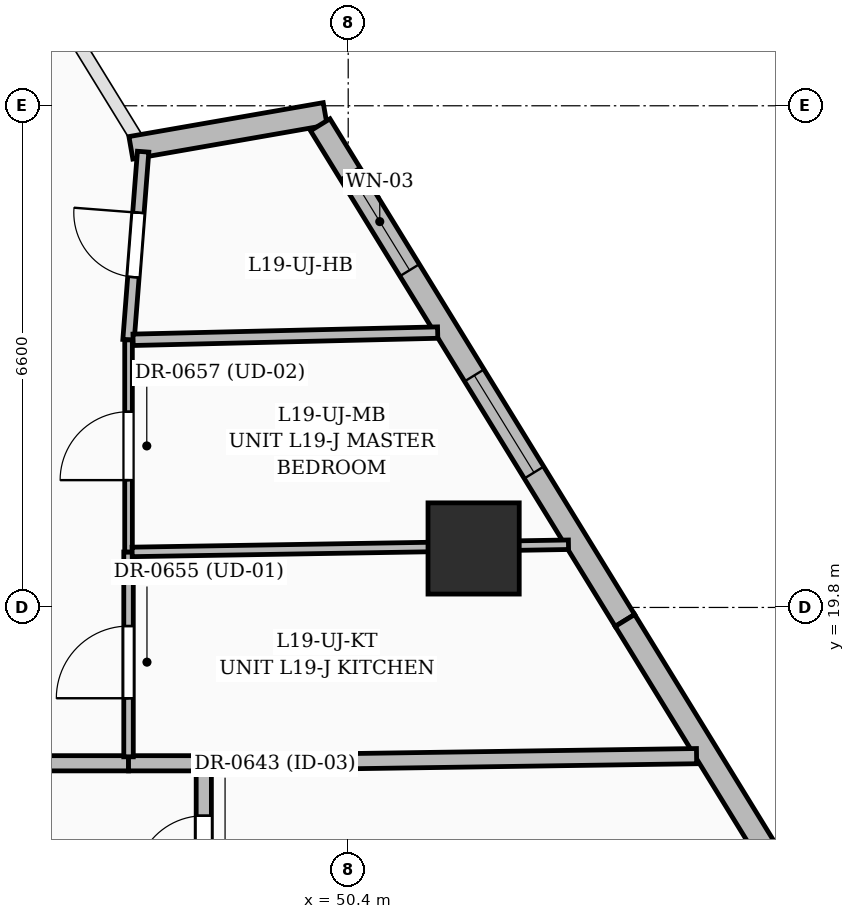
"""IFC4 building model, lengths in metres.
Left out: names, types, materials, properties, quantities, classifications, styles, units other than length and angle.
Written with IfcOpenShell. Run it as: python <this file> out.ifc"""

import sys

from ifc_helpers import new_model, si_unit, direction, frame, frame_2d, origin, origin_2d, place, context, subcontext, project, spatial, rectangle, extrude, element, fill, save


model = new_model("IFC4")
c1 = context("Model", 3, precision=1e-05, world=origin(), true_north=direction((0.0, 1.0)))
c2 = subcontext(c1, "Body", "Model", "MODEL_VIEW")
j1 = project(units=[si_unit("LENGTHUNIT", "METRE"), si_unit("PLANEANGLEUNIT", "RADIAN")], contexts=[c1])
p1 = place(None, origin())
s1 = spatial("IfcSite", under=j1, at=p1, CompositionType="ELEMENT")
p2 = place(p1, origin())
s2 = spatial("IfcBuilding", under=s1, at=p2, CompositionType="ELEMENT")
p3 = place(p2, frame((0.0, 0.0, 78.6)))
s3 = spatial("IfcBuildingStorey", under=s2, at=p3, CompositionType="ELEMENT", Elevation=78.6)
p4 = place(p3, frame((52.05, 20.576, 0.0), z_axis=(0.0, 0.0, 1.0), x_axis=(1.0, 0.0, 0.0)))
e1 = element("IfcColumn", 1, at=p4, inside=s3, PredefinedType="COLUMN", context=c2, shape_type="SweptSolid", body=[
    extrude(rectangle(XDim=1.2, YDim=1.2, at=origin_2d()), origin(), (0.0, 0.0, 1.0), 3.6),
])
p5 = place(p3, frame((47.541, 25.847, 0.0), z_axis=(0.0, 0.0, 1.0), x_axis=(0.985095505459, 0.172008270511, 0.0)))
e2 = element("IfcWall", 2, at=p5, inside=s3, PredefinedType="SOLIDWALL", context=c2, shape_type="SweptSolid", body=[
    extrude(rectangle(XDim=2.594, YDim=0.3, at=frame_2d((1.297, 0.0))), origin(), (0.0, 0.0, 1.0), 2.375),
])
p6 = place(p3, frame((50.032, 26.15, 0.0), z_axis=(0.0, 0.0, 1.0), x_axis=(0.523673810553, -0.851918857721, 0.0)))
e3 = element("IfcWall", 3, at=p6, inside=s3, PredefinedType="SOLIDWALL", context=c2, shape_type="SweptSolid", body=[
    extrude(rectangle(XDim=7.654, YDim=0.3, at=frame_2d((3.827, 0.0))), origin(), (0.0, 0.0, 1.0), 3.35),
])
p7 = place(p6, frame((0.745, 0.0, 0.6)))
e4 = element("IfcOpeningElement", 4, at=p7, cuts=e3, PredefinedType="OPENING", context=c2, shape_type="SweptSolid", body=[
    extrude(rectangle(XDim=1.5, YDim=2.1, at=frame_2d((0.75, 1.05))), frame((0.0, 0.16, 0.0), z_axis=(0.0, -1.0, 0.0), x_axis=(1.0, 0.0, 0.0)), (0.0, 0.0, 1.0), 0.32),
])
p8 = place(p6, frame((3.87, 0.0, 0.6)))
e5 = element("IfcOpeningElement", 5, at=p8, cuts=e3, PredefinedType="OPENING", context=c2, shape_type="SweptSolid", body=[
    extrude(rectangle(XDim=1.5, YDim=2.1, at=frame_2d((0.75, 1.05))), frame((0.0, 0.16, 0.0), z_axis=(0.0, -1.0, 0.0), x_axis=(1.0, 0.0, 0.0)), (0.0, 0.0, 1.0), 0.32),
])
p9 = place(p3, frame((54.041, 19.629, 0.0), z_axis=(0.0, 0.0, 1.0), x_axis=(0.523661280051, -0.851926560083, 0.0)))
e6 = element("IfcWall", 6, at=p9, inside=s3, PredefinedType="SOLIDWALL", context=c2, shape_type="SweptSolid", body=[
    extrude(rectangle(XDim=7.934, YDim=0.3, at=frame_2d((3.967, 0.0))), origin(), (0.0, 0.0, 1.0), 3.35),
])
p10 = place(p9, frame((4.05, 0.0, 0.8)))
e7 = element("IfcOpeningElement", 7, at=p10, cuts=e6, PredefinedType="OPENING", context=c2, shape_type="SweptSolid", body=[
    extrude(rectangle(XDim=1.2, YDim=1.8, at=frame_2d((0.6, 0.9))), frame((0.0, 0.16, 0.0), z_axis=(0.0, -1.0, 0.0), x_axis=(1.0, 0.0, 0.0)), (0.0, 0.0, 1.0), 0.32),
])
p11 = place(p3, frame((48.5, 15.47, 0.0), z_axis=(0.0, 0.0, 1.0), x_axis=(0.0, 1.0, 0.0)))
e8 = element("IfcWall", 8, at=p11, inside=s3, PredefinedType="PARTITIONING", context=c2, shape_type="SweptSolid", body=[
    extrude(rectangle(XDim=2.28, YDim=0.2, at=frame_2d((1.14, 0.0))), origin(), (0.0, 0.0, 1.0), 2.345),
])
p12 = place(p11, frame((0.69, 0.0, 0.0)))
e9 = element("IfcOpeningElement", 9, at=p12, cuts=e8, PredefinedType="OPENING", context=c2, shape_type="SweptSolid", body=[
    extrude(rectangle(XDim=0.9, YDim=2.1, at=frame_2d((0.45, 1.05))), frame((0.0, 0.11, 0.0), z_axis=(0.0, -1.0, 0.0), x_axis=(1.0, 0.0, 0.0)), (0.0, 0.0, 1.0), 0.22),
])
p13 = place(p3, frame((47.51, 17.75, 0.0), z_axis=(0.0, 0.0, 1.0), x_axis=(-1.0, 0.0, 0.0)))
e10 = element("IfcWall", 10, at=p13, inside=s3, PredefinedType="PARTITIONING", context=c2, shape_type="SweptSolid", body=[
    extrude(rectangle(XDim=5.57, YDim=0.2, at=frame_2d((2.785, 0.0))), origin(), (0.0, 0.0, 1.0), 2.309),
])
p14 = place(p13, frame((3.0, 0.0, 0.0)))
e11 = element("IfcOpeningElement", 11, at=p14, cuts=e10, PredefinedType="OPENING", context=c2, shape_type="SweptSolid", body=[
    extrude(rectangle(XDim=1.0, YDim=2.2, at=frame_2d((0.5, 1.1))), frame((0.0, 0.11, 0.0), z_axis=(0.0, -1.0, 0.0), x_axis=(1.0, 0.0, 0.0)), (0.0, 0.0, 1.0), 0.22),
])
p15 = place(p3, frame((48.415, 17.75, 0.0), z_axis=(0.0, 0.0, 1.0), x_axis=(-1.0, 0.0, 0.0)))
e12 = element("IfcWall", 12, at=p15, inside=s3, PredefinedType="PARTITIONING", context=c2, shape_type="SweptSolid", body=[
    extrude(rectangle(XDim=0.905, YDim=0.2, at=frame_2d((0.453, 0.0))), origin(), (0.0, 0.0, 1.0), 3.01),
])
p16 = place(p3, frame((54.983, 17.844, 0.0), z_axis=(0.0, 0.0, 1.0), x_axis=(-0.999894330503, -0.014537118977, 0.0)))
e13 = element("IfcWall", 13, at=p16, inside=s3, PredefinedType="PARTITIONING", context=c2, shape_type="SweptSolid", body=[
    extrude(rectangle(XDim=6.399, YDim=0.2, at=frame_2d((3.199, 0.0))), origin(), (0.0, 0.0, 1.0), 2.345),
])
p17 = place(p3, frame((47.51, 23.32, 0.0), z_axis=(0.0, 0.0, 1.0), x_axis=(0.077275386284, 0.997009786649, 0.0)))
e14 = element("IfcWall", 14, at=p17, inside=s3, PredefinedType="PARTITIONING", context=c2, shape_type="SweptSolid", body=[
    extrude(rectangle(XDim=2.483, YDim=0.15, at=frame_2d((1.242, 0.0))), origin(), (0.0, 0.0, 1.0), 3.35),
])
p18 = place(p17, frame((0.828, 0.0, 0.0)))
e15 = element("IfcOpeningElement", 15, at=p18, cuts=e14, PredefinedType="OPENING", context=c2, shape_type="SweptSolid", body=[
    extrude(rectangle(XDim=0.85, YDim=2.1, at=frame_2d((0.425, 1.05))), frame((0.0, 0.085, 0.0), z_axis=(0.0, -1.0, 0.0), x_axis=(1.0, 0.0, 0.0)), (0.0, 0.0, 1.0), 0.17),
])
p19 = place(p3, frame((47.51, 17.835, 0.0), z_axis=(0.0, 0.0, 1.0), x_axis=(0.0, 1.0, 0.0)))
e16 = element("IfcWall", 16, at=p19, inside=s3, PredefinedType="PARTITIONING", context=c2, shape_type="SweptSolid", body=[
    extrude(rectangle(XDim=2.695, YDim=0.125, at=frame_2d((1.348, 0.0))), origin(), (0.0, 0.0, 1.0), 3.01),
])
p20 = place(p19, frame((0.771, 0.0, 0.0)))
e17 = element("IfcOpeningElement", 17, at=p20, cuts=e16, PredefinedType="OPENING", context=c2, shape_type="SweptSolid", body=[
    extrude(rectangle(XDim=0.95, YDim=2.2, at=frame_2d((0.475, 1.1))), frame((0.0, 0.072, 0.0), z_axis=(0.0, -1.0, 0.0), x_axis=(1.0, 0.0, 0.0)), (0.0, 0.0, 1.0), 0.145),
])
p21 = place(p3, frame((47.51, 20.53, 0.0), z_axis=(0.0, 0.0, 1.0), x_axis=(0.0, 1.0, 0.0)))
e18 = element("IfcWall", 18, at=p21, inside=s3, PredefinedType="PARTITIONING", context=c2, shape_type="SweptSolid", body=[
    extrude(rectangle(XDim=2.79, YDim=0.1, at=frame_2d((1.395, 0.0))), origin(), (0.0, 0.0, 1.0), 3.01),
])
p22 = place(p21, frame((0.945, 0.0, 0.0)))
e19 = element("IfcOpeningElement", 19, at=p22, cuts=e18, PredefinedType="OPENING", context=c2, shape_type="SweptSolid", body=[
    extrude(rectangle(XDim=0.9, YDim=2.15, at=frame_2d((0.45, 1.075))), frame((0.0, 0.06, 0.0), z_axis=(0.0, -1.0, 0.0), x_axis=(1.0, 0.0, 0.0)), (0.0, 0.0, 1.0), 0.12),
])
p23 = place(p3, frame((47.57, 23.321, 0.0), z_axis=(0.0, 0.0, 1.0), x_axis=(0.999720663017, 0.023634634246, 0.0)))
e20 = element("IfcWall", 20, at=p23, inside=s3, PredefinedType="PARTITIONING", context=c2, shape_type="SweptSolid", body=[
    extrude(rectangle(XDim=4.008, YDim=0.15, at=frame_2d((2.004, 0.0))), origin(), (0.0, 0.0, 1.0), 2.37),
])
p24 = place(p3, frame((53.298, 20.625, 0.0), z_axis=(0.0, 0.0, 1.0), x_axis=(-0.9998645785, -0.016456751239, 0.0)))
e21 = element("IfcWall", 21, at=p24, inside=s3, PredefinedType="PARTITIONING", context=c2, shape_type="SweptSolid", body=[
    extrude(rectangle(XDim=5.741, YDim=0.125, at=frame_2d((2.871, 0.0))), origin(), (0.0, 0.0, 1.0), 3.01),
])
p25 = place(p7, origin())
e22 = element("IfcWindow", 22, at=p25, inside=s3, PartitioningType="SINGLE_PANEL", PredefinedType="WINDOW", context=c2, shape_type="SweptSolid", body=[
    extrude(rectangle(XDim=1.5, YDim=2.1, at=frame_2d((0.75, 1.05))), frame((0.0, 0.03, 0.0), z_axis=(0.0, -1.0, 0.0), x_axis=(1.0, 0.0, 0.0)), (0.0, 0.0, 1.0), 0.06),
])
fill(e4, e22)
p26 = place(p8, origin())
e23 = element("IfcWindow", 23, at=p26, inside=s3, PartitioningType="SINGLE_PANEL", PredefinedType="WINDOW", context=c2, shape_type="SweptSolid", body=[
    extrude(rectangle(XDim=1.5, YDim=2.1, at=frame_2d((0.75, 1.05))), frame((0.0, 0.03, 0.0), z_axis=(0.0, -1.0, 0.0), x_axis=(1.0, 0.0, 0.0)), (0.0, 0.0, 1.0), 0.06),
])
fill(e5, e23)
p27 = place(p12, origin())
e24 = element("IfcDoor", 24, at=p27, inside=s3, OperationType="SINGLE_SWING_LEFT", PredefinedType="DOOR", context=c2, shape_type="SweptSolid", body=[
    extrude(rectangle(XDim=0.9, YDim=2.1, at=frame_2d((0.45, 1.05))), frame((0.0, 0.025, 0.0), z_axis=(0.0, -1.0, 0.0), x_axis=(1.0, 0.0, 0.0)), (0.0, 0.0, 1.0), 0.05),
])
fill(e9, e24)
p28 = place(p20, origin())
e25 = element("IfcDoor", 25, at=p28, inside=s3, OperationType="SINGLE_SWING_LEFT", PredefinedType="DOOR", context=c2, shape_type="SweptSolid", body=[
    extrude(rectangle(XDim=0.95, YDim=2.2, at=frame_2d((0.475, 1.1))), frame((0.0, 0.025, 0.0), z_axis=(0.0, -1.0, 0.0), x_axis=(1.0, 0.0, 0.0)), (0.0, 0.0, 1.0), 0.05),
])
fill(e17, e25)
p29 = place(p18, origin())
e26 = element("IfcDoor", 26, at=p29, inside=s3, OperationType="SINGLE_SWING_RIGHT", PredefinedType="DOOR", context=c2, shape_type="SweptSolid", body=[
    extrude(rectangle(XDim=0.85, YDim=2.1, at=frame_2d((0.425, 1.05))), frame((0.0, 0.025, 0.0), z_axis=(0.0, -1.0, 0.0), x_axis=(1.0, 0.0, 0.0)), (0.0, 0.0, 1.0), 0.05),
])
fill(e15, e26)
p30 = place(p22, origin())
e27 = element("IfcDoor", 27, at=p30, inside=s3, OperationType="SINGLE_SWING_LEFT", PredefinedType="DOOR", context=c2, shape_type="SweptSolid", body=[
    extrude(rectangle(XDim=0.9, YDim=2.15, at=frame_2d((0.45, 1.075))), frame((0.0, 0.025, 0.0), z_axis=(0.0, -1.0, 0.0), x_axis=(1.0, 0.0, 0.0)), (0.0, 0.0, 1.0), 0.05),
])
fill(e19, e27)
save(model, sys.argv[1])
